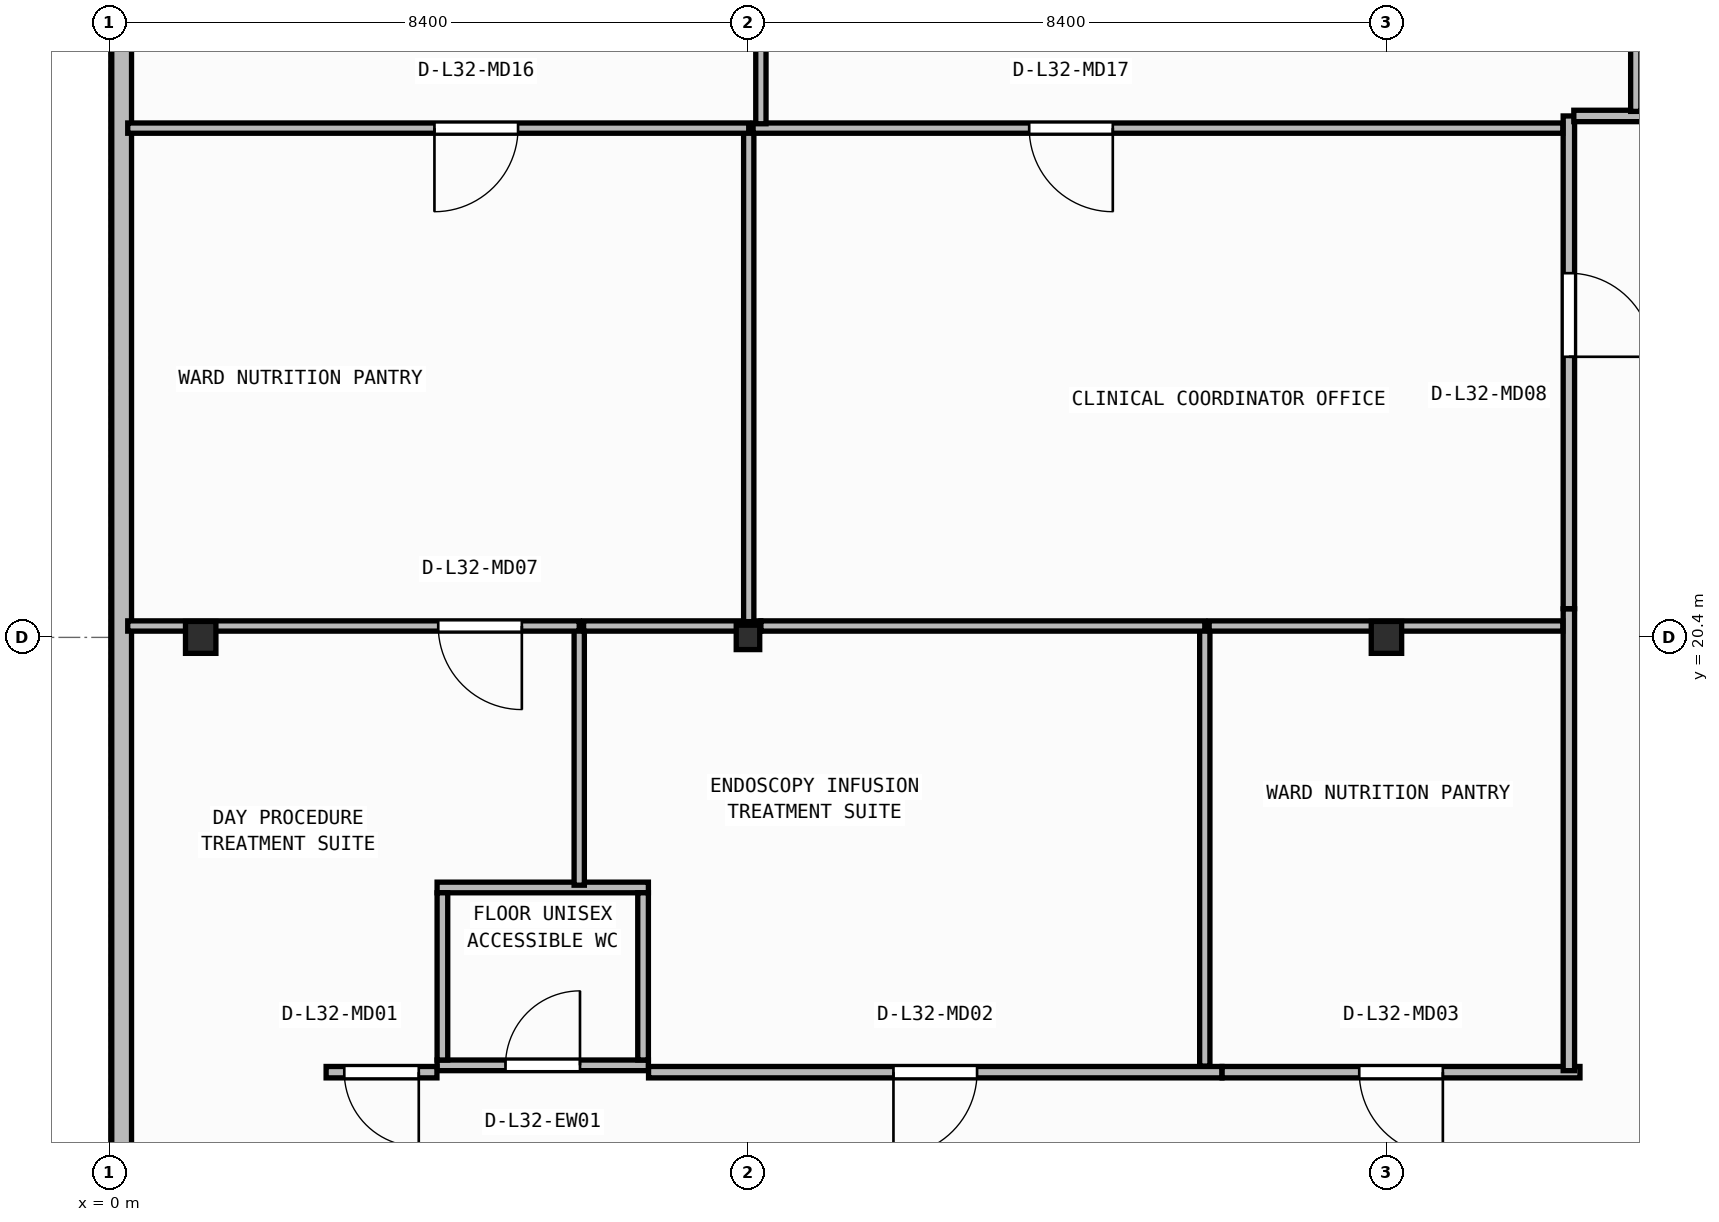
"""IFC4 building model, lengths in metres.
Left out: names, types, materials, properties, quantities, classifications, styles, units other than length and angle.
Written with IfcOpenShell. Run it as: python <this file> out.ifc"""

import sys

from ifc_helpers import new_model, si_unit, direction, frame, frame_2d, origin, origin_2d, place, context, subcontext, project, spatial, rectangle, i_section, extrude, element, fill, save


model = new_model("IFC4")
c1 = context("Model", 3, precision=1e-05, world=origin(), true_north=direction((0.0, 1.0)))
c2 = subcontext(c1, "Body", "Model", "MODEL_VIEW")
j1 = project(units=[si_unit("LENGTHUNIT", "METRE"), si_unit("PLANEANGLEUNIT", "RADIAN")], contexts=[c1])
p1 = place(None, origin())
s1 = spatial("IfcSite", under=j1, at=p1, CompositionType="ELEMENT")
p2 = place(p1, origin())
s2 = spatial("IfcBuilding", under=s1, at=p2, CompositionType="ELEMENT")
p3 = place(p2, frame((0.0, 0.0, 131.0)))
s3 = spatial("IfcBuildingStorey", under=s2, at=p3, CompositionType="ELEMENT", Elevation=131.0)
p4 = place(p3, frame((1.2, 20.4, 0.0), z_axis=(0.0, 0.0, 1.0), x_axis=(1.0, 0.0, 0.0)))
e1 = element("IfcColumn", 1, at=p4, inside=s3, PredefinedType="COLUMN", context=c2, shape_type="SweptSolid", body=[
    extrude(i_section(OverallWidth=0.4, OverallDepth=0.42, WebThickness=0.025, FlangeThickness=0.04, at=origin_2d()), origin(), (0.0, 0.0, 1.0), 3.95),
])
p5 = place(p3, frame((8.4, 20.4, 0.0), z_axis=(0.0, 0.0, 1.0), x_axis=(1.0, 0.0, 0.0)))
e2 = element("IfcColumn", 2, at=p5, inside=s3, PredefinedType="COLUMN", context=c2, shape_type="SweptSolid", body=[
    extrude(i_section(OverallWidth=0.309, OverallDepth=0.321, WebThickness=0.014, FlangeThickness=0.022, FilletRadius=0.017, at=origin_2d()), origin(), (0.0, 0.0, 1.0), 3.95),
])
p6 = place(p3, frame((16.8, 20.4, 0.0), z_axis=(0.0, 0.0, 1.0), x_axis=(1.0, 0.0, 0.0)))
e3 = element("IfcColumn", 3, at=p6, inside=s3, PredefinedType="COLUMN", context=c2, shape_type="SweptSolid", body=[
    extrude(i_section(OverallWidth=0.4, OverallDepth=0.42, WebThickness=0.025, FlangeThickness=0.04, at=origin_2d()), origin(), (0.0, 0.0, 1.0), 3.95),
])
p7 = place(p3, frame((0.16, 40.64, 0.0), z_axis=(0.0, 0.0, 1.0), x_axis=(0.0, -1.0, 0.0)))
e4 = element("IfcWall", 4, at=p7, inside=s3, PredefinedType="STANDARD", context=c2, shape_type="SweptSolid", body=[
    extrude(rectangle(XDim=37.88, YDim=0.26, at=frame_2d((18.94, 0.0))), origin(), (0.0, 0.0, 1.0), 3.71),
])
p8 = place(p7, frame((27.795, 0.0, 0.9)))
e5 = element("IfcOpeningElement", 5, at=p8, cuts=e4, PredefinedType="OPENING", context=c2, shape_type="SweptSolid", body=[
    extrude(rectangle(XDim=2.4, YDim=1.65, at=frame_2d((1.2, 0.825))), frame((0.0, 0.14, 0.0), z_axis=(0.0, -1.0, 0.0), x_axis=(1.0, 0.0, 0.0)), (0.0, 0.0, 1.0), 0.28),
])
p9 = place(p3, frame((4.31, 14.77, 0.0), z_axis=(0.0, 0.0, 1.0), x_axis=(1.0, 0.0, 0.0)))
e6 = element("IfcWall", 6, at=p9, inside=s3, PredefinedType="PARTITIONING", context=c2, shape_type="SweptSolid", body=[
    extrude(rectangle(XDim=2.78, YDim=0.14, at=frame_2d((1.39, 0.0))), origin(), (0.0, 0.0, 1.0), 3.71),
])
p10 = place(p9, frame((0.9, 0.0, 0.0)))
e7 = element("IfcOpeningElement", 7, at=p10, cuts=e6, PredefinedType="OPENING", context=c2, shape_type="SweptSolid", body=[
    extrude(rectangle(XDim=0.98, YDim=2.1, at=frame_2d((0.49, 1.05))), frame((0.0, 0.08, 0.0), z_axis=(0.0, -1.0, 0.0), x_axis=(1.0, 0.0, 0.0)), (0.0, 0.0, 1.0), 0.16),
])
p11 = place(p3, frame((4.31, 17.11, 0.0), z_axis=(0.0, 0.0, 1.0), x_axis=(1.0, 0.0, 0.0)))
e8 = element("IfcWall", 8, at=p11, inside=s3, PredefinedType="PARTITIONING", context=c2, shape_type="SweptSolid", body=[
    extrude(rectangle(XDim=2.78, YDim=0.14, at=frame_2d((1.39, 0.0))), origin(), (0.0, 0.0, 1.0), 3.71),
])
for number, where, z_axis, x_axis in (
    (9, (4.38, 14.84, 0.0), (0.0, 0.0, 1.0), (0.0, 1.0, 0.0)),
    (10, (7.02, 14.84, 0.0), (0.0, 0.0, 1.0), (0.0, 1.0, 0.0)),
):
    element("IfcWall", number, at=place(p3, frame(where, z_axis=z_axis, x_axis=x_axis)), inside=s3, PredefinedType="PARTITIONING", context=c2, shape_type="SweptSolid", body=[
        extrude(rectangle(XDim=2.2, YDim=0.14, at=frame_2d((1.1, 0.0))), origin(), (0.0, 0.0, 1.0), 3.71),
    ])
p12 = place(p3, frame((4.308, 14.68, 0.0), z_axis=(0.0, 0.0, 1.0), x_axis=(-1.0, 0.0, 0.0)))
e11 = element("IfcWall", 11, at=p12, inside=s3, PredefinedType="PARTITIONING", context=c2, shape_type="SweptSolid", body=[
    extrude(rectangle(XDim=1.458, YDim=0.15, at=frame_2d((0.729, 0.0))), origin(), (0.0, 0.0, 1.0), 3.71),
])
p13 = place(p12, frame((0.239, 0.0, 0.0)))
e12 = element("IfcOpeningElement", 12, at=p13, cuts=e11, PredefinedType="OPENING", context=c2, shape_type="SweptSolid", body=[
    extrude(rectangle(XDim=0.98, YDim=2.1, at=frame_2d((0.49, 1.05))), frame((0.0, 0.085, 0.0), z_axis=(0.0, -1.0, 0.0), x_axis=(1.0, 0.0, 0.0)), (0.0, 0.0, 1.0), 0.17),
])
p14 = place(p3, frame((14.636, 14.68, 0.0), z_axis=(0.0, 0.0, 1.0), x_axis=(-1.0, 0.0, 0.0)))
e13 = element("IfcWall", 13, at=p14, inside=s3, PredefinedType="PARTITIONING", context=c2, shape_type="SweptSolid", body=[
    extrude(rectangle(XDim=7.544, YDim=0.15, at=frame_2d((3.772, 0.0))), origin(), (0.0, 0.0, 1.0), 3.71),
])
p15 = place(p14, frame((3.222, 0.0, 0.0)))
e14 = element("IfcOpeningElement", 14, at=p15, cuts=e13, PredefinedType="OPENING", context=c2, shape_type="SweptSolid", body=[
    extrude(rectangle(XDim=1.1, YDim=2.1, at=frame_2d((0.55, 1.05))), frame((0.0, 0.085, 0.0), z_axis=(0.0, -1.0, 0.0), x_axis=(1.0, 0.0, 0.0)), (0.0, 0.0, 1.0), 0.17),
])
p16 = place(p3, frame((19.346, 14.68, 0.0), z_axis=(0.0, 0.0, 1.0), x_axis=(-1.0, 0.0, 0.0)))
e15 = element("IfcWall", 15, at=p16, inside=s3, PredefinedType="PARTITIONING", context=c2, shape_type="SweptSolid", body=[
    extrude(rectangle(XDim=4.708, YDim=0.15, at=frame_2d((2.354, 0.0))), origin(), (0.0, 0.0, 1.0), 3.71),
])
p17 = place(p16, frame((1.804, 0.0, 0.0)))
e16 = element("IfcOpeningElement", 16, at=p17, cuts=e15, PredefinedType="OPENING", context=c2, shape_type="SweptSolid", body=[
    extrude(rectangle(XDim=1.1, YDim=2.1, at=frame_2d((0.55, 1.05))), frame((0.0, 0.085, 0.0), z_axis=(0.0, -1.0, 0.0), x_axis=(1.0, 0.0, 0.0)), (0.0, 0.0, 1.0), 0.17),
])
p18 = place(p3, frame((19.2, 20.776, 0.0), z_axis=(0.0, 0.0, 1.0), x_axis=(0.0, -1.0, 0.0)))
e17 = element("IfcWall", 17, at=p18, inside=s3, PredefinedType="PARTITIONING", context=c2, shape_type="SweptSolid", body=[
    extrude(rectangle(XDim=6.076, YDim=0.15, at=frame_2d((3.038, 0.0))), origin(), (0.0, 0.0, 1.0), 3.71),
])
p19 = place(p3, frame((19.2, 27.26, 0.0), z_axis=(0.0, 0.0, 1.0), x_axis=(0.0, -1.0, 0.0)))
e18 = element("IfcWall", 18, at=p19, inside=s3, PredefinedType="PARTITIONING", context=c2, shape_type="SweptSolid", body=[
    extrude(rectangle(XDim=6.482, YDim=0.15, at=frame_2d((3.241, 0.0))), origin(), (0.0, 0.0, 1.0), 3.71),
])
p20 = place(p19, frame((2.068, 0.0, 0.0)))
e19 = element("IfcOpeningElement", 19, at=p20, cuts=e18, PredefinedType="OPENING", context=c2, shape_type="SweptSolid", body=[
    extrude(rectangle(XDim=1.1, YDim=2.1, at=frame_2d((0.55, 1.05))), frame((0.0, 0.085, 0.0), z_axis=(0.0, -1.0, 0.0), x_axis=(1.0, 0.0, 0.0)), (0.0, 0.0, 1.0), 0.17),
])
p21 = place(p3, frame((21.7, 27.26, 0.0), z_axis=(0.0, 0.0, 1.0), x_axis=(-1.0, 0.0, 0.0)))
e20 = element("IfcWall", 20, at=p21, inside=s3, PredefinedType="PARTITIONING", context=c2, shape_type="SweptSolid", body=[
    extrude(rectangle(XDim=2.435, YDim=0.15, at=frame_2d((1.218, 0.0))), origin(), (0.0, 0.0, 1.0), 3.71),
])
p22 = place(p21, frame((0.223, 0.0, 0.0)))
e21 = element("IfcOpeningElement", 21, at=p22, cuts=e20, PredefinedType="OPENING", context=c2, shape_type="SweptSolid", body=[
    extrude(rectangle(XDim=1.1, YDim=2.1, at=frame_2d((0.55, 1.05))), frame((0.0, 0.085, 0.0), z_axis=(0.0, -1.0, 0.0), x_axis=(1.0, 0.0, 0.0)), (0.0, 0.0, 1.0), 0.17),
])
p23 = place(p3, frame((6.18, 17.14, 0.0), z_axis=(0.0, 0.0, 1.0), x_axis=(0.0, 1.0, 0.0)))
e22 = element("IfcWall", 22, at=p23, inside=s3, PredefinedType="PARTITIONING", context=c2, shape_type="SweptSolid", body=[
    extrude(rectangle(XDim=3.41, YDim=0.135, at=frame_2d((1.705, 0.0))), origin(), (0.0, 0.0, 1.0), 3.71),
])
p24 = place(p3, frame((6.18, 20.55, 0.0), z_axis=(0.0, 0.0, 1.0), x_axis=(-1.0, 0.0, 0.0)))
e23 = element("IfcWall", 23, at=p24, inside=s3, PredefinedType="PARTITIONING", context=c2, shape_type="SweptSolid", body=[
    extrude(rectangle(XDim=5.94, YDim=0.135, at=frame_2d((2.97, 0.0))), origin(), (0.0, 0.0, 1.0), 3.083),
])
p25 = place(p24, frame((0.755, 0.0, 0.0)))
e24 = element("IfcOpeningElement", 24, at=p25, cuts=e23, PredefinedType="OPENING", context=c2, shape_type="SweptSolid", body=[
    extrude(rectangle(XDim=1.1, YDim=2.1, at=frame_2d((0.55, 1.05))), frame((0.0, 0.077, 0.0), z_axis=(0.0, -1.0, 0.0), x_axis=(1.0, 0.0, 0.0)), (0.0, 0.0, 1.0), 0.155),
])
p26 = place(p3, frame((14.41, 14.76, 0.0), z_axis=(0.0, 0.0, 1.0), x_axis=(0.0, 1.0, 0.0)))
e25 = element("IfcWall", 25, at=p26, inside=s3, PredefinedType="PARTITIONING", context=c2, shape_type="SweptSolid", body=[
    extrude(rectangle(XDim=5.79, YDim=0.135, at=frame_2d((2.895, 0.0))), origin(), (0.0, 0.0, 1.0), 3.71),
])
p27 = place(p3, frame((8.568, 20.55, 0.0), z_axis=(0.0, 0.0, 1.0), x_axis=(-1.0, 0.0, 0.0)))
e26 = element("IfcWall", 26, at=p27, inside=s3, PredefinedType="PARTITIONING", context=c2, shape_type="SweptSolid", body=[
    extrude(rectangle(XDim=2.331, YDim=0.135, at=frame_2d((1.166, 0.0))), origin(), (0.0, 0.0, 1.0), 3.083),
])
p28 = place(p3, frame((14.41, 20.55, 0.0), z_axis=(0.0, 0.0, 1.0), x_axis=(-1.0, 0.0, 0.0)))
e27 = element("IfcWall", 27, at=p28, inside=s3, PredefinedType="PARTITIONING", context=c2, shape_type="SweptSolid", body=[
    extrude(rectangle(XDim=5.84, YDim=0.135, at=frame_2d((2.92, 0.0))), origin(), (0.0, 0.0, 1.0), 3.083),
])
p29 = place(p3, frame((19.12, 20.55, 0.0), z_axis=(0.0, 0.0, 1.0), x_axis=(-1.0, 0.0, 0.0)))
e28 = element("IfcWall", 28, at=p29, inside=s3, PredefinedType="PARTITIONING", context=c2, shape_type="SweptSolid", body=[
    extrude(rectangle(XDim=4.653, YDim=0.135, at=frame_2d((2.326, 0.0))), origin(), (0.0, 0.0, 1.0), 3.083),
])
p30 = place(p3, frame((8.41, 20.607, 0.0), z_axis=(0.0, 0.0, 1.0), x_axis=(0.0, 1.0, 0.0)))
e29 = element("IfcWall", 29, at=p30, inside=s3, PredefinedType="PARTITIONING", context=c2, shape_type="SweptSolid", body=[
    extrude(rectangle(XDim=6.493, YDim=0.135, at=frame_2d((3.246, 0.0))), origin(), (0.0, 0.0, 1.0), 3.152),
])
p31 = place(p3, frame((8.41, 27.1, 0.0), z_axis=(0.0, 0.0, 1.0), x_axis=(-1.0, 0.0, 0.0)))
e30 = element("IfcWall", 30, at=p31, inside=s3, PredefinedType="PARTITIONING", context=c2, shape_type="SweptSolid", body=[
    extrude(rectangle(XDim=8.17, YDim=0.135, at=frame_2d((4.085, 0.0))), origin(), (0.0, 0.0, 1.0), 3.71),
])
p32 = place(p31, frame((3.035, 0.0, 0.0)))
e31 = element("IfcOpeningElement", 31, at=p32, cuts=e30, PredefinedType="OPENING", context=c2, shape_type="SweptSolid", body=[
    extrude(rectangle(XDim=1.1, YDim=2.1, at=frame_2d((0.55, 1.05))), frame((0.0, 0.077, 0.0), z_axis=(0.0, -1.0, 0.0), x_axis=(1.0, 0.0, 0.0)), (0.0, 0.0, 1.0), 0.155),
])
p33 = place(p3, frame((19.12, 27.1, 0.0), z_axis=(0.0, 0.0, 1.0), x_axis=(-1.0, 0.0, 0.0)))
e32 = element("IfcWall", 32, at=p33, inside=s3, PredefinedType="PARTITIONING", context=c2, shape_type="SweptSolid", body=[
    extrude(rectangle(XDim=10.653, YDim=0.135, at=frame_2d((5.326, 0.0))), origin(), (0.0, 0.0, 1.0), 3.71),
])
p34 = place(p33, frame((5.92, 0.0, 0.0)))
e33 = element("IfcOpeningElement", 33, at=p34, cuts=e32, PredefinedType="OPENING", context=c2, shape_type="SweptSolid", body=[
    extrude(rectangle(XDim=1.1, YDim=2.1, at=frame_2d((0.55, 1.05))), frame((0.0, 0.077, 0.0), z_axis=(0.0, -1.0, 0.0), x_axis=(1.0, 0.0, 0.0)), (0.0, 0.0, 1.0), 0.155),
])
p35 = place(p3, frame((8.57, 27.157, 0.0), z_axis=(0.0, 0.0, 1.0), x_axis=(0.0, 1.0, 0.0)))
e34 = element("IfcWall", 34, at=p35, inside=s3, PredefinedType="PARTITIONING", context=c2, shape_type="SweptSolid", body=[
    extrude(rectangle(XDim=12.095, YDim=0.135, at=frame_2d((6.048, 0.0))), origin(), (0.0, 0.0, 1.0), 3.152),
])
p36 = place(p3, frame((20.08, 27.32, 0.0), z_axis=(0.0, 0.0, 1.0), x_axis=(0.0, 1.0, 0.0)))
e35 = element("IfcWall", 35, at=p36, inside=s3, PredefinedType="PARTITIONING", context=c2, shape_type="SweptSolid", body=[
    extrude(rectangle(XDim=6.107, YDim=0.135, at=frame_2d((3.053, 0.0))), origin(), (0.0, 0.0, 1.0), 3.71),
])
p37 = place(p10, origin())
e36 = element("IfcDoor", 36, at=p37, inside=s3, OperationType="SINGLE_SWING_RIGHT", PredefinedType="DOOR", context=c2, shape_type="SweptSolid", body=[
    extrude(rectangle(XDim=0.98, YDim=2.1, at=frame_2d((0.49, 1.05))), frame((0.0, 0.025, 0.0), z_axis=(0.0, -1.0, 0.0), x_axis=(1.0, 0.0, 0.0)), (0.0, 0.0, 1.0), 0.05),
])
fill(e7, e36)
p38 = place(p13, origin())
e37 = element("IfcDoor", 37, at=p38, inside=s3, OperationType="SINGLE_SWING_LEFT", PredefinedType="DOOR", context=c2, shape_type="SweptSolid", body=[
    extrude(rectangle(XDim=0.98, YDim=2.1, at=frame_2d((0.49, 1.05))), frame((0.0, 0.025, 0.0), z_axis=(0.0, -1.0, 0.0), x_axis=(1.0, 0.0, 0.0)), (0.0, 0.0, 1.0), 0.05),
])
fill(e12, e37)
p39 = place(p15, origin())
e38 = element("IfcDoor", 38, at=p39, inside=s3, OperationType="SINGLE_SWING_RIGHT", PredefinedType="DOOR", context=c2, shape_type="SweptSolid", body=[
    extrude(rectangle(XDim=1.1, YDim=2.1, at=frame_2d((0.55, 1.05))), frame((0.0, 0.025, 0.0), z_axis=(0.0, -1.0, 0.0), x_axis=(1.0, 0.0, 0.0)), (0.0, 0.0, 1.0), 0.05),
])
fill(e14, e38)
p40 = place(p17, origin())
e39 = element("IfcDoor", 39, at=p40, inside=s3, OperationType="SINGLE_SWING_LEFT", PredefinedType="DOOR", context=c2, shape_type="SweptSolid", body=[
    extrude(rectangle(XDim=1.1, YDim=2.1, at=frame_2d((0.55, 1.05))), frame((0.0, 0.025, 0.0), z_axis=(0.0, -1.0, 0.0), x_axis=(1.0, 0.0, 0.0)), (0.0, 0.0, 1.0), 0.05),
])
fill(e16, e39)
p41 = place(p20, origin())
e40 = element("IfcDoor", 40, at=p41, inside=s3, OperationType="SINGLE_SWING_RIGHT", PredefinedType="DOOR", context=c2, shape_type="SweptSolid", body=[
    extrude(rectangle(XDim=1.1, YDim=2.1, at=frame_2d((0.55, 1.05))), frame((0.0, 0.025, 0.0), z_axis=(0.0, -1.0, 0.0), x_axis=(1.0, 0.0, 0.0)), (0.0, 0.0, 1.0), 0.05),
])
fill(e19, e40)
p42 = place(p25, origin())
e41 = element("IfcDoor", 41, at=p42, inside=s3, OperationType="SINGLE_SWING_LEFT", PredefinedType="DOOR", context=c2, shape_type="SweptSolid", body=[
    extrude(rectangle(XDim=1.1, YDim=2.1, at=frame_2d((0.55, 1.05))), frame((0.0, 0.025, 0.0), z_axis=(0.0, -1.0, 0.0), x_axis=(1.0, 0.0, 0.0)), (0.0, 0.0, 1.0), 0.05),
])
fill(e24, e41)
p43 = place(p32, origin())
e42 = element("IfcDoor", 42, at=p43, inside=s3, OperationType="SINGLE_SWING_RIGHT", PredefinedType="DOOR", context=c2, shape_type="SweptSolid", body=[
    extrude(rectangle(XDim=1.1, YDim=2.1, at=frame_2d((0.55, 1.05))), frame((0.0, 0.025, 0.0), z_axis=(0.0, -1.0, 0.0), x_axis=(1.0, 0.0, 0.0)), (0.0, 0.0, 1.0), 0.05),
])
fill(e31, e42)
p44 = place(p34, origin())
e43 = element("IfcDoor", 43, at=p44, inside=s3, OperationType="SINGLE_SWING_LEFT", PredefinedType="DOOR", context=c2, shape_type="SweptSolid", body=[
    extrude(rectangle(XDim=1.1, YDim=2.1, at=frame_2d((0.55, 1.05))), frame((0.0, 0.025, 0.0), z_axis=(0.0, -1.0, 0.0), x_axis=(1.0, 0.0, 0.0)), (0.0, 0.0, 1.0), 0.05),
])
fill(e33, e43)
save(model, sys.argv[1])
